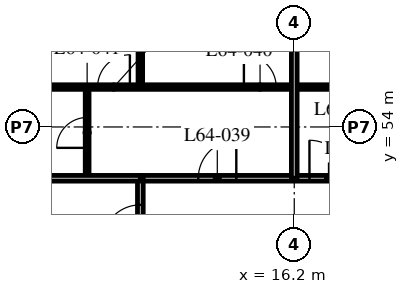
"""IFC4 building model, lengths in metres.
Left out: names, types, materials, properties, quantities, classifications, styles, units other than length and angle.
Written with IfcOpenShell. Run it as: python <this file> out.ifc"""

import sys

from ifc_helpers import new_model, si_unit, direction, frame, frame_2d, origin, place, context, subcontext, project, spatial, rectangle, extrude, element, fill, save


model = new_model("IFC4")
c1 = context("Model", 3, precision=1e-05, world=origin(), true_north=direction((0.0, 1.0)))
c2 = subcontext(c1, "Body", "Model", "MODEL_VIEW")
j1 = project(units=[si_unit("LENGTHUNIT", "METRE"), si_unit("PLANEANGLEUNIT", "RADIAN")], contexts=[c1])
p1 = place(None, origin())
s1 = spatial("IfcSite", under=j1, at=p1, CompositionType="ELEMENT")
p2 = place(p1, origin())
s2 = spatial("IfcBuilding", under=s1, at=p2, CompositionType="ELEMENT")
p3 = place(p2, frame((0.0, 0.0, 250.2)))
s3 = spatial("IfcBuildingStorey", under=s2, at=p3, CompositionType="ELEMENT", Elevation=250.2)
p4 = place(p3, frame((12.15, 52.65, 0.0), z_axis=(0.0, 0.0, 1.0), x_axis=(1.0, 0.0, 0.0)))
e1 = element("IfcWall", 1, at=p4, inside=s3, PredefinedType="PARTITIONING", context=c2, shape_type="SweptSolid", body=[
    extrude(rectangle(XDim=24.3, YDim=0.15, at=frame_2d((12.15, 0.0))), origin(), (0.0, 0.0, 1.0), 3.69),
])
p5 = place(p4, frame((4.45, 0.0, 0.0)))
e2 = element("IfcOpeningElement", 2, at=p5, cuts=e1, PredefinedType="OPENING", context=c2, shape_type="SweptSolid", body=[
    extrude(rectangle(XDim=1.0, YDim=2.1, at=frame_2d((0.5, 1.05))), frame((0.0, 0.085, 0.0), z_axis=(0.0, -1.0, 0.0), x_axis=(1.0, 0.0, 0.0)), (0.0, 0.0, 1.0), 0.17),
])
p6 = place(p4, frame((1.525, 0.0, 0.0)))
e3 = element("IfcOpeningElement", 3, at=p6, cuts=e1, PredefinedType="OPENING", context=c2, shape_type="SweptSolid", body=[
    extrude(rectangle(XDim=1.0, YDim=2.1, at=frame_2d((0.5, 1.05))), frame((0.0, 0.085, 0.0), z_axis=(0.0, -1.0, 0.0), x_axis=(1.0, 0.0, 0.0)), (0.0, 0.0, 1.0), 0.17),
])
p7 = place(p3, frame((12.15, 22.5, 0.0), z_axis=(0.0, 0.0, 1.0), x_axis=(0.0, 1.0, 0.0)))
e4 = element("IfcWall", 4, at=p7, inside=s3, PredefinedType="PARTITIONING", context=c2, shape_type="SweptSolid", body=[
    extrude(rectangle(XDim=30.15, YDim=0.15, at=frame_2d((15.075, 0.0))), origin(), (0.0, 0.0, 1.0), 3.69),
])
p8 = place(p7, frame((0.4, 0.0, 0.0)))
e5 = element("IfcOpeningElement", 5, at=p8, cuts=e4, PredefinedType="OPENING", context=c2, shape_type="SweptSolid", body=[
    extrude(rectangle(XDim=1.0, YDim=2.1, at=frame_2d((0.5, 1.05))), frame((0.0, 0.085, 0.0), z_axis=(0.0, -1.0, 0.0), x_axis=(1.0, 0.0, 0.0)), (0.0, 0.0, 1.0), 0.17),
])
p9 = place(p7, frame((24.4, 0.0, 0.0)))
e6 = element("IfcOpeningElement", 6, at=p9, cuts=e4, PredefinedType="OPENING", context=c2, shape_type="SweptSolid", body=[
    extrude(rectangle(XDim=1.0, YDim=2.1, at=frame_2d((0.5, 1.05))), frame((0.0, 0.085, 0.0), z_axis=(0.0, -1.0, 0.0), x_axis=(1.0, 0.0, 0.0)), (0.0, 0.0, 1.0), 0.17),
])
p10 = place(p7, frame((28.45, 0.0, 0.0)))
e7 = element("IfcOpeningElement", 7, at=p10, cuts=e4, PredefinedType="OPENING", context=c2, shape_type="SweptSolid", body=[
    extrude(rectangle(XDim=1.0, YDim=2.1, at=frame_2d((0.5, 1.05))), frame((0.0, 0.085, 0.0), z_axis=(0.0, -1.0, 0.0), x_axis=(1.0, 0.0, 0.0)), (0.0, 0.0, 1.0), 0.17),
])
p11 = place(p3, frame((10.75, 52.65, 0.0), z_axis=(0.0, 0.0, 1.0), x_axis=(0.0, 1.0, 0.0)))
e8 = element("IfcWall", 8, at=p11, inside=s3, PredefinedType="PARTITIONING", context=c2, shape_type="SweptSolid", body=[
    extrude(rectangle(XDim=2.4, YDim=0.1, at=frame_2d((1.2, 0.0))), origin(), (0.0, 0.0, 1.0), 3.69),
])
p12 = place(p11, frame((0.8, 0.0, 0.0)))
e9 = element("IfcOpeningElement", 9, at=p12, cuts=e8, PredefinedType="OPENING", context=c2, shape_type="SweptSolid", body=[
    extrude(rectangle(XDim=0.8, YDim=2.1, at=frame_2d((0.4, 1.05))), frame((0.0, 0.06, 0.0), z_axis=(0.0, -1.0, 0.0), x_axis=(1.0, 0.0, 0.0)), (0.0, 0.0, 1.0), 0.12),
])
p13 = place(p3, frame((8.15, 55.05, 0.0), z_axis=(0.0, 0.0, 1.0), x_axis=(1.0, 0.0, 0.0)))
e10 = element("IfcWall", 10, at=p13, inside=s3, PredefinedType="PARTITIONING", context=c2, shape_type="SweptSolid", body=[
    extrude(rectangle(XDim=28.3, YDim=0.12, at=frame_2d((14.15, 0.0))), origin(), (0.0, 0.0, 1.0), 3.69),
])
p14 = place(p13, frame((9.025, 0.0, 0.0)))
e11 = element("IfcOpeningElement", 11, at=p14, cuts=e10, PredefinedType="OPENING", context=c2, shape_type="SweptSolid", body=[
    extrude(rectangle(XDim=0.85, YDim=2.1, at=frame_2d((0.425, 1.05))), frame((0.0, 0.07, 0.0), z_axis=(0.0, -1.0, 0.0), x_axis=(1.0, 0.0, 0.0)), (0.0, 0.0, 1.0), 0.14),
])
p15 = place(p13, frame((16.475, 0.0, 0.0)))
e12 = element("IfcOpeningElement", 12, at=p15, cuts=e10, PredefinedType="OPENING", context=c2, shape_type="SweptSolid", body=[
    extrude(rectangle(XDim=0.85, YDim=2.1, at=frame_2d((0.425, 1.05))), frame((0.0, 0.07, 0.0), z_axis=(0.0, -1.0, 0.0), x_axis=(1.0, 0.0, 0.0)), (0.0, 0.0, 1.0), 0.14),
])
p16 = place(p13, frame((20.525, 0.0, 0.0)))
e13 = element("IfcOpeningElement", 13, at=p16, cuts=e10, PredefinedType="OPENING", context=c2, shape_type="SweptSolid", body=[
    extrude(rectangle(XDim=0.85, YDim=2.1, at=frame_2d((0.425, 1.05))), frame((0.0, 0.07, 0.0), z_axis=(0.0, -1.0, 0.0), x_axis=(1.0, 0.0, 0.0)), (0.0, 0.0, 1.0), 0.14),
])
p17 = place(p13, frame((24.575, 0.0, 0.0)))
e14 = element("IfcOpeningElement", 14, at=p17, cuts=e10, PredefinedType="OPENING", context=c2, shape_type="SweptSolid", body=[
    extrude(rectangle(XDim=0.85, YDim=2.1, at=frame_2d((0.425, 1.05))), frame((0.0, 0.07, 0.0), z_axis=(0.0, -1.0, 0.0), x_axis=(1.0, 0.0, 0.0)), (0.0, 0.0, 1.0), 0.14),
])
p18 = place(p13, frame((6.725, 0.0, 0.0)))
e15 = element("IfcOpeningElement", 15, at=p18, cuts=e10, PredefinedType="OPENING", context=c2, shape_type="SweptSolid", body=[
    extrude(rectangle(XDim=0.85, YDim=2.1, at=frame_2d((0.425, 1.05))), frame((0.0, 0.07, 0.0), z_axis=(0.0, -1.0, 0.0), x_axis=(1.0, 0.0, 0.0)), (0.0, 0.0, 1.0), 0.14),
])
p19 = place(p13, frame((2.875, 0.0, 0.0)))
e16 = element("IfcOpeningElement", 16, at=p19, cuts=e10, PredefinedType="OPENING", context=c2, shape_type="SweptSolid", body=[
    extrude(rectangle(XDim=0.85, YDim=2.1, at=frame_2d((0.425, 1.05))), frame((0.0, 0.07, 0.0), z_axis=(0.0, -1.0, 0.0), x_axis=(1.0, 0.0, 0.0)), (0.0, 0.0, 1.0), 0.14),
])
p20 = place(p3, frame((12.15, 55.05, 0.0), z_axis=(0.0, 0.0, 1.0), x_axis=(0.0, 1.0, 0.0)))
e17 = element("IfcWall", 17, at=p20, inside=s3, PredefinedType="PARTITIONING", context=c2, shape_type="SweptSolid", body=[
    extrude(rectangle(XDim=9.45, YDim=0.12, at=frame_2d((4.725, 0.0))), origin(), (0.0, 0.0, 1.0), 3.69),
])
p21 = place(p3, frame((0.3, 52.65, 0.0), z_axis=(0.0, 0.0, 1.0), x_axis=(1.0, 0.0, 0.0)))
e18 = element("IfcWall", 18, at=p21, inside=s3, PredefinedType="PARTITIONING", context=c2, shape_type="SweptSolid", body=[
    extrude(rectangle(XDim=11.85, YDim=0.15, at=frame_2d((5.925, 0.0))), origin(), (0.0, 0.0, 1.0), 3.69),
])
p22 = place(p3, frame((16.2, 52.65, 0.0), z_axis=(0.0, 0.0, 1.0), x_axis=(0.0, 1.0, 0.0)))
e19 = element("IfcWall", 19, at=p22, inside=s3, PredefinedType="PARTITIONING", context=c2, shape_type="SweptSolid", body=[
    extrude(rectangle(XDim=11.85, YDim=0.15, at=frame_2d((5.925, 0.0))), origin(), (0.0, 0.0, 1.0), 3.078),
])
p23 = place(p5, origin())
e20 = element("IfcDoor", 20, at=p23, inside=s3, OperationType="SINGLE_SWING_LEFT", PredefinedType="DOOR", context=c2, shape_type="SweptSolid", body=[
    extrude(rectangle(XDim=1.0, YDim=2.1, at=frame_2d((0.5, 1.05))), frame((0.0, 0.025, 0.0), z_axis=(0.0, -1.0, 0.0), x_axis=(1.0, 0.0, 0.0)), (0.0, 0.0, 1.0), 0.05),
])
fill(e2, e20)
p24 = place(p10, origin())
e21 = element("IfcDoor", 21, at=p24, inside=s3, OperationType="SINGLE_SWING_LEFT", PredefinedType="DOOR", context=c2, shape_type="SweptSolid", body=[
    extrude(rectangle(XDim=1.0, YDim=2.1, at=frame_2d((0.5, 1.05))), frame((0.0, 0.025, 0.0), z_axis=(0.0, -1.0, 0.0), x_axis=(1.0, 0.0, 0.0)), (0.0, 0.0, 1.0), 0.05),
])
fill(e7, e21)
p25 = place(p6, origin())
e22 = element("IfcDoor", 22, at=p25, inside=s3, OperationType="SINGLE_SWING_RIGHT", PredefinedType="DOOR", context=c2, shape_type="SweptSolid", body=[
    extrude(rectangle(XDim=1.0, YDim=2.1, at=frame_2d((0.5, 1.05))), frame((0.0, 0.025, 0.0), z_axis=(0.0, -1.0, 0.0), x_axis=(1.0, 0.0, 0.0)), (0.0, 0.0, 1.0), 0.05),
])
fill(e3, e22)
p26 = place(p18, origin())
e23 = element("IfcDoor", 23, at=p26, inside=s3, OperationType="SINGLE_SWING_LEFT", PredefinedType="DOOR", context=c2, shape_type="SweptSolid", body=[
    extrude(rectangle(XDim=0.85, YDim=2.1, at=frame_2d((0.425, 1.05))), frame((0.0, 0.025, 0.0), z_axis=(0.0, -1.0, 0.0), x_axis=(1.0, 0.0, 0.0)), (0.0, 0.0, 1.0), 0.05),
])
fill(e15, e23)
p27 = place(p12, origin())
e24 = element("IfcDoor", 24, at=p27, inside=s3, OperationType="SINGLE_SWING_LEFT", PredefinedType="DOOR", context=c2, shape_type="SweptSolid", body=[
    extrude(rectangle(XDim=0.8, YDim=2.1, at=frame_2d((0.4, 1.05))), frame((0.0, 0.025, 0.0), z_axis=(0.0, -1.0, 0.0), x_axis=(1.0, 0.0, 0.0)), (0.0, 0.0, 1.0), 0.05),
])
fill(e9, e24)
p28 = place(p19, origin())
e25 = element("IfcDoor", 25, at=p28, inside=s3, OperationType="SINGLE_SWING_RIGHT", PredefinedType="DOOR", context=c2, shape_type="SweptSolid", body=[
    extrude(rectangle(XDim=0.85, YDim=2.1, at=frame_2d((0.425, 1.05))), frame((0.0, 0.025, 0.0), z_axis=(0.0, -1.0, 0.0), x_axis=(1.0, 0.0, 0.0)), (0.0, 0.0, 1.0), 0.05),
])
fill(e16, e25)
save(model, sys.argv[1])
